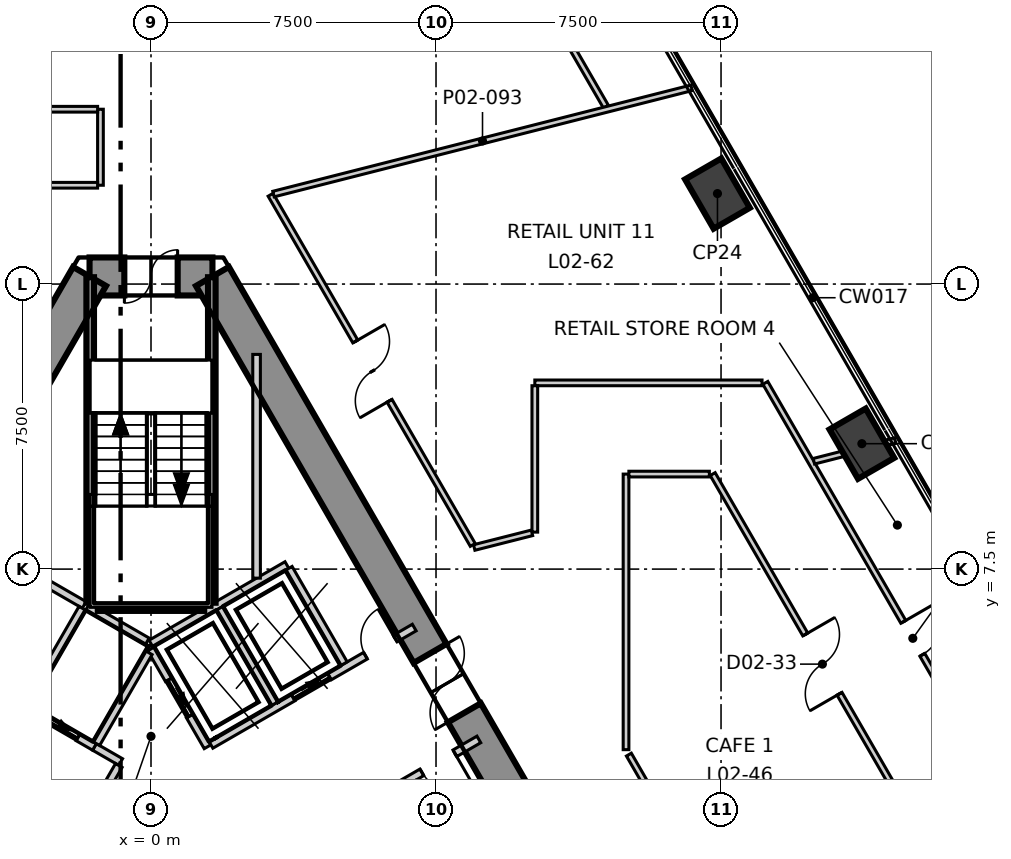
"""IFC4 building model, lengths in metres.
Left out: names, types, materials, properties, quantities, classifications, styles, units other than length and angle.
Written with IfcOpenShell. Run it as: python <this file> out.ifc"""

import sys

from ifc_helpers import new_model, si_unit, direction, frame, frame_2d, origin, origin_2d, place, context, subcontext, project, spatial, polyline, rectangle, outline, extrude, element, fill, save


model = new_model("IFC4")
c1 = context("Model", 3, precision=1e-05, world=origin(), true_north=direction((0.0, 1.0)))
c2 = subcontext(c1, "Body", "Model", "MODEL_VIEW")
j1 = project(units=[si_unit("LENGTHUNIT", "METRE"), si_unit("PLANEANGLEUNIT", "RADIAN")], contexts=[c1])
p1 = place(None, origin())
s1 = spatial("IfcSite", under=j1, at=p1, CompositionType="ELEMENT")
p2 = place(p1, origin())
s2 = spatial("IfcBuilding", under=s1, at=p2, CompositionType="ELEMENT")
p3 = place(p2, frame((0.0, 0.0, 14.5)))
s3 = spatial("IfcBuildingStorey", under=s2, at=p3, CompositionType="ELEMENT", Elevation=14.5)
p4 = place(p3, frame((1.617, 15.2, -0.4), z_axis=(0.0, 0.0, 1.0), x_axis=(-1.0, 0.0, 0.0)))
e1 = element("IfcWall", 1, at=p4, inside=s3, PredefinedType="SHEAR", context=c2, shape_type="SweptSolid", body=[
    extrude(outline(polyline([(-0.288, -0.5), (1.617, -0.5), (3.522, -0.5), (2.945, 0.5), (1.617, 0.5), (0.289, 0.5), (-0.288, -0.5)])), origin(), (0.0, 0.0, 1.0), 5.4),
])
p5 = place(p4, frame((0.917, 0.0, 0.4)))
e2 = element("IfcOpeningElement", 2, at=p5, cuts=e1, PredefinedType="OPENING", context=c2, shape_type="SweptSolid", body=[
    extrude(rectangle(XDim=1.4, YDim=2.1, at=frame_2d((0.7, 1.05))), frame((0.0, 0.51, 0.0), z_axis=(0.0, -1.0, 0.0), x_axis=(1.0, 0.0, 0.0)), (0.0, 0.0, 1.0), 1.02),
])
p6 = place(p3, frame((-1.617, 15.2, -0.4), z_axis=(0.0, 0.0, 1.0), x_axis=(-0.499992141631, -0.866029940768, 0.0)))
e3 = element("IfcWall", 3, at=p6, inside=s3, PredefinedType="SHEAR", context=c2, shape_type="SweptSolid", body=[
    extrude(outline(polyline([(-0.289, -0.499), (1.656, -0.499), (3.601, -0.499), (5.547, -0.499), (7.492, -0.499), (9.437, -0.5), (11.382, -0.5), (13.328, -0.5), (15.273, -0.5), (17.218, -0.5), (19.163, -0.5), (21.109, -0.5), (23.054, -0.5), (24.999, -0.5), (24.422, 0.5), (22.566, 0.5), (20.709, 0.5), (18.853, 0.5), (16.997, 0.5), (15.14, 0.5), (13.284, 0.5), (11.427, 0.5), (9.571, 0.5), (7.715, 0.5), (5.858, 0.5), (4.002, 0.5), (2.146, 0.5), (0.289, 0.5), (-0.289, -0.499)])), origin(), (0.0, 0.0, 1.0), 5.4),
])
p7 = place(p6, frame((11.805, 0.0, 0.4)))
e4 = element("IfcOpeningElement", 4, at=p7, cuts=e3, PredefinedType="OPENING", context=c2, shape_type="SweptSolid", body=[
    extrude(rectangle(XDim=1.1, YDim=2.1, at=frame_2d((0.55, 1.05))), frame((0.0, 0.51, 0.0), z_axis=(0.0, -1.0, 0.0), x_axis=(1.0, 0.0, 0.0)), (0.0, 0.0, 1.0), 1.02),
])
p8 = place(p3, frame((13.972, -6.2, -0.4), z_axis=(0.0, 0.0, 1.0), x_axis=(-0.499992141631, 0.866029940768, 0.0)))
e5 = element("IfcWall", 5, at=p8, inside=s3, PredefinedType="SHEAR", context=c2, shape_type="SweptSolid", body=[
    extrude(outline(polyline([(-0.288, -0.5), (1.657, -0.5), (3.602, -0.5), (5.547, -0.5), (7.493, -0.5), (9.438, -0.5), (11.383, -0.5), (13.328, -0.5), (15.273, -0.5), (17.218, -0.499), (19.164, -0.499), (21.109, -0.499), (23.054, -0.499), (24.999, -0.499), (24.422, 0.5), (22.566, 0.5), (20.709, 0.5), (18.853, 0.5), (16.996, 0.5), (15.14, 0.5), (13.283, 0.5), (11.427, 0.5), (9.57, 0.5), (7.714, 0.5), (5.857, 0.5), (4.001, 0.5), (2.145, 0.5), (0.288, 0.5), (-0.288, -0.5)])), origin(), (0.0, 0.0, 1.0), 5.4),
])
p9 = place(p8, frame((11.455, 0.0, 0.4)))
e6 = element("IfcOpeningElement", 6, at=p9, cuts=e5, PredefinedType="OPENING", context=c2, shape_type="SweptSolid", body=[
    extrude(rectangle(XDim=1.8, YDim=2.1, at=frame_2d((0.9, 1.05))), frame((0.0, 0.51, 0.0), z_axis=(0.0, -1.0, 0.0), x_axis=(1.0, 0.0, 0.0)), (0.0, 0.0, 1.0), 1.02),
])
for number, where, z_axis, x_axis in (
    (7, (18.706, 10.8, -0.4), (0.0, 0.0, 1.0), (-0.5, 0.866, 0.0)),
    (8, (14.906, 17.381, -0.4), (0.0, 0.0, 1.0), (-0.5, 0.866, 0.0)),
):
    element("IfcColumn", number, at=place(p3, frame(where, z_axis=z_axis, x_axis=x_axis)), inside=s3, PredefinedType="COLUMN", context=c2, shape_type="SweptSolid", body=[
        extrude(rectangle(XDim=1.5, YDim=1.1, at=origin_2d()), origin(), (0.0, 0.0, 1.0), 5.4),
    ])
p10 = place(p3, frame((-1.33, 17.6, 0.0), z_axis=(0.0, 0.0, 1.0), x_axis=(0.0, 1.0, 0.0)))
e9 = element("IfcWall", 9, at=p10, inside=s3, PredefinedType="PARTITIONING", context=c2, shape_type="SweptSolid", body=[
    extrude(rectangle(XDim=2.0, YDim=0.15, at=frame_2d((1.0, 0.0))), origin(), (0.0, 0.0, 1.0), 4.15),
])
p11 = place(p3, frame((-11.922, 19.6, 0.0), z_axis=(0.0, 0.0, 1.0), x_axis=(1.0, 0.0, 0.0)))
e10 = element("IfcWall", 10, at=p11, inside=s3, PredefinedType="PARTITIONING", context=c2, shape_type="SweptSolid", body=[
    extrude(rectangle(XDim=10.517, YDim=0.15, at=frame_2d((5.259, 0.0))), origin(), (0.0, 0.0, 1.0), 5.0),
])
p12 = place(p11, frame((4.353, 0.0, 0.0)))
e11 = element("IfcOpeningElement", 11, at=p12, cuts=e10, PredefinedType="OPENING", context=c2, shape_type="SweptSolid", body=[
    extrude(rectangle(XDim=1.8, YDim=2.1, at=frame_2d((0.9, 1.05))), frame((0.0, 0.085, 0.0), z_axis=(0.0, -1.0, 0.0), x_axis=(1.0, 0.0, 0.0)), (0.0, 0.0, 1.0), 0.17),
])
p13 = place(p3, frame((-2.916, 17.6, 0.0), z_axis=(0.0, 0.0, 1.0), x_axis=(1.0, 0.0, 0.0)))
e12 = element("IfcWall", 12, at=p13, inside=s3, PredefinedType="PARTITIONING", context=c2, shape_type="SweptSolid", body=[
    extrude(rectangle(XDim=1.511, YDim=0.15, at=frame_2d((0.755, 0.0))), origin(), (0.0, 0.0, 1.0), 5.0),
])
p14 = place(p3, frame((5.816, 30.325, 0.0), z_axis=(0.0, 0.0, 1.0), x_axis=(0.500075634353, -0.865981731866, 0.0)))
e13 = element("IfcWall", 13, at=p14, inside=s3, PredefinedType="PARTITIONING", context=c2, shape_type="SweptSolid", body=[
    extrude(rectangle(XDim=12.306, YDim=0.15, at=frame_2d((6.153, 0.0))), origin(), (0.0, 0.0, 1.0), 5.0),
])
p15 = place(p14, frame((4.722, 0.0, 0.0)))
e14 = element("IfcOpeningElement", 14, at=p15, cuts=e13, PredefinedType="OPENING", context=c2, shape_type="SweptSolid", body=[
    extrude(rectangle(XDim=1.0, YDim=2.1, at=frame_2d((0.5, 1.05))), frame((0.0, 0.085, 0.0), z_axis=(0.0, -1.0, 0.0), x_axis=(1.0, 0.0, 0.0)), (0.0, 0.0, 1.0), 0.17),
])
p16 = place(p3, frame((16.166, 12.4, 0.0), z_axis=(0.0, 0.0, 1.0), x_axis=(0.499977560568, -0.866038358809, 0.0)))
e15 = element("IfcWall", 15, at=p16, inside=s3, PredefinedType="PARTITIONING", context=c2, shape_type="SweptSolid", body=[
    extrude(rectangle(XDim=16.541, YDim=0.15, at=frame_2d((8.271, 0.0))), origin(), (0.0, 0.0, 1.0), 5.0),
])
p17 = place(p16, frame((7.261, 0.0, 0.0)))
e16 = element("IfcOpeningElement", 16, at=p17, cuts=e15, PredefinedType="OPENING", context=c2, shape_type="SweptSolid", body=[
    extrude(rectangle(XDim=1.0, YDim=2.1, at=frame_2d((0.5, 1.05))), frame((0.0, 0.085, 0.0), z_axis=(0.0, -1.0, 0.0), x_axis=(1.0, 0.0, 0.0)), (0.0, 0.0, 1.0), 0.17),
])
p18 = place(p3, frame((10.1, 12.4, 0.0), z_axis=(0.0, 0.0, 1.0), x_axis=(1.0, 0.0, 0.0)))
e17 = element("IfcWall", 17, at=p18, inside=s3, PredefinedType="PARTITIONING", context=c2, shape_type="SweptSolid", body=[
    extrude(rectangle(XDim=5.979, YDim=0.15, at=frame_2d((2.99, 0.0))), origin(), (0.0, 0.0, 1.0), 5.0),
])
p19 = place(p3, frame((10.1, 8.473, 0.0), z_axis=(0.0, 0.0, 1.0), x_axis=(0.0, 1.0, 0.0)))
e18 = element("IfcWall", 18, at=p19, inside=s3, PredefinedType="PARTITIONING", context=c2, shape_type="SweptSolid", body=[
    extrude(rectangle(XDim=3.852, YDim=0.15, at=frame_2d((1.926, 0.0))), origin(), (0.0, 0.0, 1.0), 5.0),
])
p20 = place(p3, frame((8.505, 8.068, 0.0), z_axis=(0.0, 0.0, 1.0), x_axis=(0.969238432808, 0.246123668851, 0.0)))
e19 = element("IfcWall", 19, at=p20, inside=s3, PredefinedType="PARTITIONING", context=c2, shape_type="SweptSolid", body=[
    extrude(rectangle(XDim=1.568, YDim=0.15, at=frame_2d((0.784, 0.0))), origin(), (0.0, 0.0, 1.0), 5.0),
])
p21 = place(p3, frame((17.443, 10.338, 0.0), z_axis=(0.0, 0.0, 1.0), x_axis=(0.969125534663, 0.246567836636, 0.0)))
e20 = element("IfcWall", 20, at=p21, inside=s3, PredefinedType="PARTITIONING", context=c2, shape_type="SweptSolid", body=[
    extrude(rectangle(XDim=2.207, YDim=0.15, at=frame_2d((1.104, 0.0))), origin(), (0.0, 0.0, 1.0), 5.0),
])
p22 = place(p3, frame((3.147, 17.349, 0.0), z_axis=(0.0, 0.0, 1.0), x_axis=(0.500060803479, -0.865990296034, 0.0)))
e21 = element("IfcWall", 21, at=p22, inside=s3, PredefinedType="PARTITIONING", context=c2, shape_type="SweptSolid", body=[
    extrude(rectangle(XDim=10.639, YDim=0.15, at=frame_2d((5.319, 0.0))), origin(), (0.0, 0.0, 1.0), 5.0),
])
p23 = place(p22, frame((4.458, 0.0, 0.0)))
e22 = element("IfcOpeningElement", 22, at=p23, cuts=e21, PredefinedType="OPENING", context=c2, shape_type="SweptSolid", body=[
    extrude(rectangle(XDim=1.8, YDim=2.1, at=frame_2d((0.9, 1.05))), frame((0.0, 0.085, 0.0), z_axis=(0.0, -1.0, 0.0), x_axis=(1.0, 0.0, 0.0)), (0.0, 0.0, 1.0), 0.17),
])
p24 = place(p3, frame((3.223, 17.368, 0.0), z_axis=(0.0, 0.0, 1.0), x_axis=(0.969205432145, 0.246253589415, 0.0)))
e23 = element("IfcWall", 23, at=p24, inside=s3, PredefinedType="PARTITIONING", context=c2, shape_type="SweptSolid", body=[
    extrude(rectangle(XDim=11.351, YDim=0.15, at=frame_2d((5.675, 0.0))), origin(), (0.0, 0.0, 1.0), 5.0),
])
p25 = place(p3, frame((14.78, 10.0, 0.0), z_axis=(0.0, 0.0, 1.0), x_axis=(0.500027479704, -0.866009537788, 0.0)))
e24 = element("IfcWall", 24, at=p25, inside=s3, PredefinedType="PARTITIONING", context=c2, shape_type="SweptSolid", body=[
    extrude(rectangle(XDim=11.547, YDim=0.15, at=frame_2d((5.773, 0.0))), origin(), (0.0, 0.0, 1.0), 5.0),
])
p26 = place(p25, frame((4.874, 0.0, 0.0)))
e25 = element("IfcOpeningElement", 25, at=p26, cuts=e24, PredefinedType="OPENING", context=c2, shape_type="SweptSolid", body=[
    extrude(rectangle(XDim=1.8, YDim=2.1, at=frame_2d((0.9, 1.05))), frame((0.0, 0.085, 0.0), z_axis=(0.0, -1.0, 0.0), x_axis=(1.0, 0.0, 0.0)), (0.0, 0.0, 1.0), 0.17),
])
p27 = place(p3, frame((12.5, 2.749, 0.0), z_axis=(0.0, 0.0, 1.0), x_axis=(0.0, 1.0, 0.0)))
e26 = element("IfcWall", 26, at=p27, inside=s3, PredefinedType="PARTITIONING", context=c2, shape_type="SweptSolid", body=[
    extrude(rectangle(XDim=7.251, YDim=0.15, at=frame_2d((3.625, 0.0))), origin(), (0.0, 0.0, 1.0), 5.0),
])
p28 = place(p3, frame((12.575, 10.0, 0.0), z_axis=(0.0, 0.0, 1.0), x_axis=(1.0, 0.0, 0.0)))
e27 = element("IfcWall", 27, at=p28, inside=s3, PredefinedType="PARTITIONING", context=c2, shape_type="SweptSolid", body=[
    extrude(rectangle(XDim=2.118, YDim=0.15, at=frame_2d((1.059, 0.0))), origin(), (0.0, 0.0, 1.0), 5.0),
])
p29 = place(p3, frame((12.575, 2.619, 0.0), z_axis=(0.0, 0.0, 1.0), x_axis=(0.500062965414, -0.865989047634, 0.0)))
e28 = element("IfcWall", 28, at=p29, inside=s3, PredefinedType="PARTITIONING", context=c2, shape_type="SweptSolid", body=[
    extrude(rectangle(XDim=2.938, YDim=0.15, at=frame_2d((1.469, 0.0))), origin(), (0.0, 0.0, 1.0), 5.0),
])
p30 = place(p3, frame((-0.002, 5.541, 0.0), z_axis=(0.0, 0.0, 1.0), x_axis=(0.86600155993, 0.500041296494, 0.0)))
e29 = element("IfcWall", 29, at=p30, inside=s3, PredefinedType="SOLIDWALL", context=c2, shape_type="SweptSolid", body=[
    extrude(rectangle(XDim=4.132, YDim=0.2, at=frame_2d((2.066, 0.0))), origin(), (0.0, 0.0, 1.0), 5.0),
])
p31 = place(p3, frame((0.0, 5.4, 0.0), z_axis=(0.0, 0.0, 1.0), x_axis=(0.500103862429, -0.865965430478, 0.0)))
e30 = element("IfcWall", 30, at=p31, inside=s3, PredefinedType="SOLIDWALL", context=c2, shape_type="SweptSolid", body=[
    extrude(rectangle(XDim=2.973, YDim=0.2, at=frame_2d((1.487, 0.0))), origin(), (0.0, 0.0, 1.0), 5.0),
])
p32 = place(p31, frame((0.937, 0.0, 0.0)))
e31 = element("IfcOpeningElement", 31, at=p32, cuts=e30, PredefinedType="OPENING", context=c2, shape_type="SweptSolid", body=[
    extrude(rectangle(XDim=1.1, YDim=2.1, at=frame_2d((0.55, 1.05))), frame((0.0, 0.11, 0.0), z_axis=(0.0, -1.0, 0.0), x_axis=(1.0, 0.0, 0.0)), (0.0, 0.0, 1.0), 0.22),
])
p33 = place(p3, frame((1.578, 2.874, 0.0), z_axis=(0.0, 0.0, 1.0), x_axis=(0.866055259465, 0.499948284879, 0.0)))
e32 = element("IfcWall", 32, at=p33, inside=s3, PredefinedType="SOLIDWALL", context=c2, shape_type="SweptSolid", body=[
    extrude(rectangle(XDim=6.177, YDim=0.2, at=frame_2d((3.088, 0.0))), origin(), (0.0, 0.0, 1.0), 5.0),
])
p34 = place(p33, frame((2.496, 0.0, 0.0)))
e33 = element("IfcOpeningElement", 33, at=p34, cuts=e32, PredefinedType="OPENING", context=c2, shape_type="SweptSolid", body=[
    extrude(rectangle(XDim=1.1, YDim=2.1, at=frame_2d((0.55, 1.05))), frame((0.0, 0.11, 0.0), z_axis=(0.0, -1.0, 0.0), x_axis=(1.0, 0.0, 0.0)), (0.0, 0.0, 1.0), 0.22),
])
p35 = place(p33, frame((4.696, 0.0, 0.0)))
e34 = element("IfcOpeningElement", 34, at=p35, cuts=e32, PredefinedType="OPENING", context=c2, shape_type="SweptSolid", body=[
    extrude(rectangle(XDim=0.9, YDim=2.1, at=frame_2d((0.45, 1.05))), frame((0.0, 0.11, 0.0), z_axis=(0.0, -1.0, 0.0), x_axis=(1.0, 0.0, 0.0)), (0.0, 0.0, 1.0), 0.22),
])
p36 = place(p3, frame((3.278, -0.071, 0.0), z_axis=(0.0, 0.0, 1.0), x_axis=(0.865959795517, 0.500113619639, 0.0)))
e35 = element("IfcWall", 35, at=p36, inside=s3, PredefinedType="SOLIDWALL", context=c2, shape_type="SweptSolid", body=[
    extrude(rectangle(XDim=6.177, YDim=0.2, at=frame_2d((3.088, 0.0))), origin(), (0.0, 0.0, 1.0), 5.0),
])
p37 = place(p36, frame((4.447, 0.0, 0.0)))
e36 = element("IfcOpeningElement", 36, at=p37, cuts=e35, PredefinedType="OPENING", context=c2, shape_type="SweptSolid", body=[
    extrude(rectangle(XDim=1.0, YDim=2.1, at=frame_2d((0.5, 1.05))), frame((0.0, 0.11, 0.0), z_axis=(0.0, -1.0, 0.0), x_axis=(1.0, 0.0, 0.0)), (0.0, 0.0, 1.0), 0.22),
])
for number, where, z_axis, x_axis in (
    (37, (3.626, 7.52, 0.0), (0.0, 0.0, 1.0), (0.5, -0.866, 0.0)),
    (38, (1.807, 6.47, 0.0), (0.0, 0.0, 1.0), (0.5, -0.866, 0.0)),
):
    element("IfcWall", number, at=place(p3, frame(where, z_axis=z_axis, x_axis=x_axis)), inside=s3, PredefinedType="SOLIDWALL", context=c2, shape_type="SweptSolid", body=[
        extrude(rectangle(XDim=2.9, YDim=0.2, at=frame_2d((1.45, 0.0))), origin(), (0.0, 0.0, 1.0), 5.0),
    ])
p38 = place(p3, frame((-1.488, 2.822, 0.0), z_axis=(0.0, 0.0, 1.0), x_axis=(0.866236612152, -0.499633997809, 0.0)))
e39 = element("IfcWall", 39, at=p38, inside=s3, PredefinedType="SOLIDWALL", context=c2, shape_type="SweptSolid", body=[
    extrude(rectangle(XDim=0.796, YDim=0.2, at=frame_2d((0.398, 0.0))), origin(), (0.0, 0.0, 1.0), 5.0),
])
p39 = place(p3, frame((-3.489, 7.557, 0.0), z_axis=(0.0, 0.0, 1.0), x_axis=(0.866010750942, -0.50002537861, 0.0)))
e40 = element("IfcWall", 40, at=p39, inside=s3, PredefinedType="SOLIDWALL", context=c2, shape_type="SweptSolid", body=[
    extrude(rectangle(XDim=2.0, YDim=0.2, at=frame_2d((1.0, 0.0))), origin(), (0.0, 0.0, 1.0), 5.0),
])
p40 = place(p3, frame((-2.444, -0.433, 0.0), z_axis=(0.0, 0.0, 1.0), x_axis=(0.500035624827, 0.866004834804, 0.0)))
e41 = element("IfcWall", 41, at=p40, inside=s3, PredefinedType="SOLIDWALL", context=c2, shape_type="SweptSolid", body=[
    extrude(rectangle(XDim=3.194, YDim=0.2, at=frame_2d((1.597, 0.0))), origin(), (0.0, 0.0, 1.0), 5.0),
])
p41 = place(p3, frame((-3.309, 3.873, 0.0), z_axis=(0.0, 0.0, 1.0), x_axis=(0.866098583652, -0.499873227325, 0.0)))
e42 = element("IfcWall", 42, at=p41, inside=s3, PredefinedType="SOLIDWALL", context=c2, shape_type="SweptSolid", body=[
    extrude(rectangle(XDim=2.103, YDim=0.2, at=frame_2d((1.051, 0.0))), origin(), (0.0, 0.0, 1.0), 5.0),
])
p42 = place(p41, frame((0.502, 0.0, 0.0)))
e43 = element("IfcOpeningElement", 43, at=p42, cuts=e42, PredefinedType="OPENING", context=c2, shape_type="SweptSolid", body=[
    extrude(rectangle(XDim=1.1, YDim=2.1, at=frame_2d((0.55, 1.05))), frame((0.0, 0.11, 0.0), z_axis=(0.0, -1.0, 0.0), x_axis=(1.0, 0.0, 0.0)), (0.0, 0.0, 1.0), 0.22),
])
p43 = place(p3, frame((-3.257, 3.959, 0.0), z_axis=(0.0, 0.0, 1.0), x_axis=(0.50012328804, 0.865954211699, 0.0)))
e44 = element("IfcWall", 44, at=p43, inside=s3, PredefinedType="SOLIDWALL", context=c2, shape_type="SweptSolid", body=[
    extrude(rectangle(XDim=2.9, YDim=0.2, at=frame_2d((1.45, 0.0))), origin(), (0.0, 0.0, 1.0), 5.0),
])
p44 = place(p3, frame((-1.67, 6.507, 0.0), z_axis=(0.0, 0.0, 1.0), x_axis=(0.865941441609, -0.500145398563, 0.0)))
e45 = element("IfcWall", 45, at=p44, inside=s3, PredefinedType="SOLIDWALL", context=c2, shape_type="SweptSolid", body=[
    extrude(rectangle(XDim=1.815, YDim=0.2, at=frame_2d((0.908, 0.0))), origin(), (0.0, 0.0, 1.0), 5.0),
])
p45 = place(p3, frame((-1.438, 2.909, 0.0), z_axis=(0.0, 0.0, 1.0), x_axis=(0.499829630636, 0.866123744241, 0.0)))
e46 = element("IfcWall", 46, at=p45, inside=s3, PredefinedType="SOLIDWALL", context=c2, shape_type="SweptSolid", body=[
    extrude(rectangle(XDim=2.761, YDim=0.2, at=frame_2d((1.38, 0.0))), origin(), (0.0, 0.0, 1.0), 5.0),
])
p46 = place(p3, frame((2.778, 7.262, 0.0), z_axis=(0.0, 0.0, 1.0), x_axis=(0.0, 1.0, 0.0)))
e47 = element("IfcWall", 47, at=p46, inside=s3, PredefinedType="SOLIDWALL", context=c2, shape_type="SweptSolid", body=[
    extrude(rectangle(XDim=5.887, YDim=0.2, at=frame_2d((2.943, 0.0))), origin(), (0.0, 0.0, 1.0), 5.0),
])
p47 = place(p3, frame((1.6, 6.615, 0.0), z_axis=(0.0, 0.0, 1.0), x_axis=(0.0, 1.0, 0.0)))
e48 = element("IfcWall", 48, at=p47, inside=s3, PredefinedType="SOLIDWALL", context=c2, shape_type="SweptSolid", body=[
    extrude(rectangle(XDim=8.565, YDim=0.2, at=frame_2d((4.282, 0.0))), origin(), (0.0, 0.0, 1.0), 5.0),
])
p48 = place(p3, frame((-1.4, 6.5, 0.0), z_axis=(0.0, 0.0, 1.0), x_axis=(1.0, 0.0, 0.0)))
e49 = element("IfcWall", 49, at=p48, inside=s3, PredefinedType="SOLIDWALL", context=c2, shape_type="SweptSolid", body=[
    extrude(rectangle(XDim=2.8, YDim=0.2, at=frame_2d((1.4, 0.0))), origin(), (0.0, 0.0, 1.0), 5.0),
])
p49 = place(p3, frame((-1.6, 6.615, 0.0), z_axis=(0.0, 0.0, 1.0), x_axis=(0.0, 1.0, 0.0)))
e50 = element("IfcWall", 50, at=p49, inside=s3, PredefinedType="SOLIDWALL", context=c2, shape_type="SweptSolid", body=[
    extrude(rectangle(XDim=8.565, YDim=0.2, at=frame_2d((4.282, 0.0))), origin(), (0.0, 0.0, 1.0), 5.0),
])
p50 = place(p32, origin())
e51 = element("IfcDoor", 51, at=p50, inside=s3, OperationType="SLIDING_TO_LEFT", PredefinedType="DOOR", context=c2, shape_type="SweptSolid", body=[
    extrude(rectangle(XDim=1.1, YDim=2.1, at=frame_2d((0.55, 1.05))), frame((0.0, 0.025, 0.0), z_axis=(0.0, -1.0, 0.0), x_axis=(1.0, 0.0, 0.0)), (0.0, 0.0, 1.0), 0.05),
])
fill(e31, e51)
p51 = place(p34, origin())
e52 = element("IfcDoor", 52, at=p51, inside=s3, OperationType="SLIDING_TO_LEFT", PredefinedType="DOOR", context=c2, shape_type="SweptSolid", body=[
    extrude(rectangle(XDim=1.1, YDim=2.1, at=frame_2d((0.55, 1.05))), frame((0.0, 0.025, 0.0), z_axis=(0.0, -1.0, 0.0), x_axis=(1.0, 0.0, 0.0)), (0.0, 0.0, 1.0), 0.05),
])
fill(e33, e52)
p52 = place(p42, origin())
e53 = element("IfcDoor", 53, at=p52, inside=s3, OperationType="SLIDING_TO_LEFT", PredefinedType="DOOR", context=c2, shape_type="SweptSolid", body=[
    extrude(rectangle(XDim=1.1, YDim=2.1, at=frame_2d((0.55, 1.05))), frame((0.0, 0.025, 0.0), z_axis=(0.0, -1.0, 0.0), x_axis=(1.0, 0.0, 0.0)), (0.0, 0.0, 1.0), 0.05),
])
fill(e43, e53)
p53 = place(p26, origin())
e54 = element("IfcDoor", 54, at=p53, inside=s3, OperationType="DOUBLE_DOOR_SINGLE_SWING", PredefinedType="DOOR", context=c2, shape_type="SweptSolid", body=[
    extrude(rectangle(XDim=1.8, YDim=2.1, at=frame_2d((0.9, 1.05))), frame((0.0, 0.025, 0.0), z_axis=(0.0, -1.0, 0.0), x_axis=(1.0, 0.0, 0.0)), (0.0, 0.0, 1.0), 0.05),
])
fill(e25, e54)
p54 = place(p17, origin())
e55 = element("IfcDoor", 55, at=p54, inside=s3, OperationType="SINGLE_SWING_RIGHT", PredefinedType="DOOR", context=c2, shape_type="SweptSolid", body=[
    extrude(rectangle(XDim=1.0, YDim=2.1, at=frame_2d((0.5, 1.05))), frame((0.0, 0.025, 0.0), z_axis=(0.0, -1.0, 0.0), x_axis=(1.0, 0.0, 0.0)), (0.0, 0.0, 1.0), 0.05),
])
fill(e16, e55)
p55 = place(p23, origin())
e56 = element("IfcDoor", 56, at=p55, inside=s3, OperationType="DOUBLE_DOOR_SINGLE_SWING", PredefinedType="DOOR", context=c2, shape_type="SweptSolid", body=[
    extrude(rectangle(XDim=1.8, YDim=2.1, at=frame_2d((0.9, 1.05))), frame((0.0, 0.025, 0.0), z_axis=(0.0, -1.0, 0.0), x_axis=(1.0, 0.0, 0.0)), (0.0, 0.0, 1.0), 0.05),
])
fill(e22, e56)
p56 = place(p9, origin())
e57 = element("IfcDoor", 57, at=p56, inside=s3, OperationType="DOUBLE_DOOR_SINGLE_SWING", PredefinedType="DOOR", context=c2, shape_type="SweptSolid", body=[
    extrude(rectangle(XDim=1.8, YDim=2.1, at=frame_2d((0.9, 1.05))), frame((0.0, 0.025, 0.0), z_axis=(0.0, -1.0, 0.0), x_axis=(1.0, 0.0, 0.0)), (0.0, 0.0, 1.0), 0.05),
])
fill(e6, e57)
p57 = place(p5, origin())
e58 = element("IfcDoor", 58, at=p57, inside=s3, OperationType="DOUBLE_DOOR_SINGLE_SWING", PredefinedType="DOOR", context=c2, shape_type="SweptSolid", body=[
    extrude(rectangle(XDim=1.4, YDim=2.1, at=frame_2d((0.7, 1.05))), frame((0.0, 0.025, 0.0), z_axis=(0.0, -1.0, 0.0), x_axis=(1.0, 0.0, 0.0)), (0.0, 0.0, 1.0), 0.05),
])
fill(e2, e58)
p58 = place(p35, origin())
e59 = element("IfcDoor", 59, at=p58, inside=s3, OperationType="SINGLE_SWING_LEFT", PredefinedType="DOOR", context=c2, shape_type="SweptSolid", body=[
    extrude(rectangle(XDim=0.9, YDim=2.1, at=frame_2d((0.45, 1.05))), frame((0.0, 0.025, 0.0), z_axis=(0.0, -1.0, 0.0), x_axis=(1.0, 0.0, 0.0)), (0.0, 0.0, 1.0), 0.05),
])
fill(e34, e59)
p59 = place(p37, origin())
e60 = element("IfcDoor", 60, at=p59, inside=s3, OperationType="SINGLE_SWING_RIGHT", PredefinedType="DOOR", context=c2, shape_type="SweptSolid", body=[
    extrude(rectangle(XDim=1.0, YDim=2.1, at=frame_2d((0.5, 1.05))), frame((0.0, 0.025, 0.0), z_axis=(0.0, -1.0, 0.0), x_axis=(1.0, 0.0, 0.0)), (0.0, 0.0, 1.0), 0.05),
])
fill(e36, e60)
save(model, sys.argv[1])
